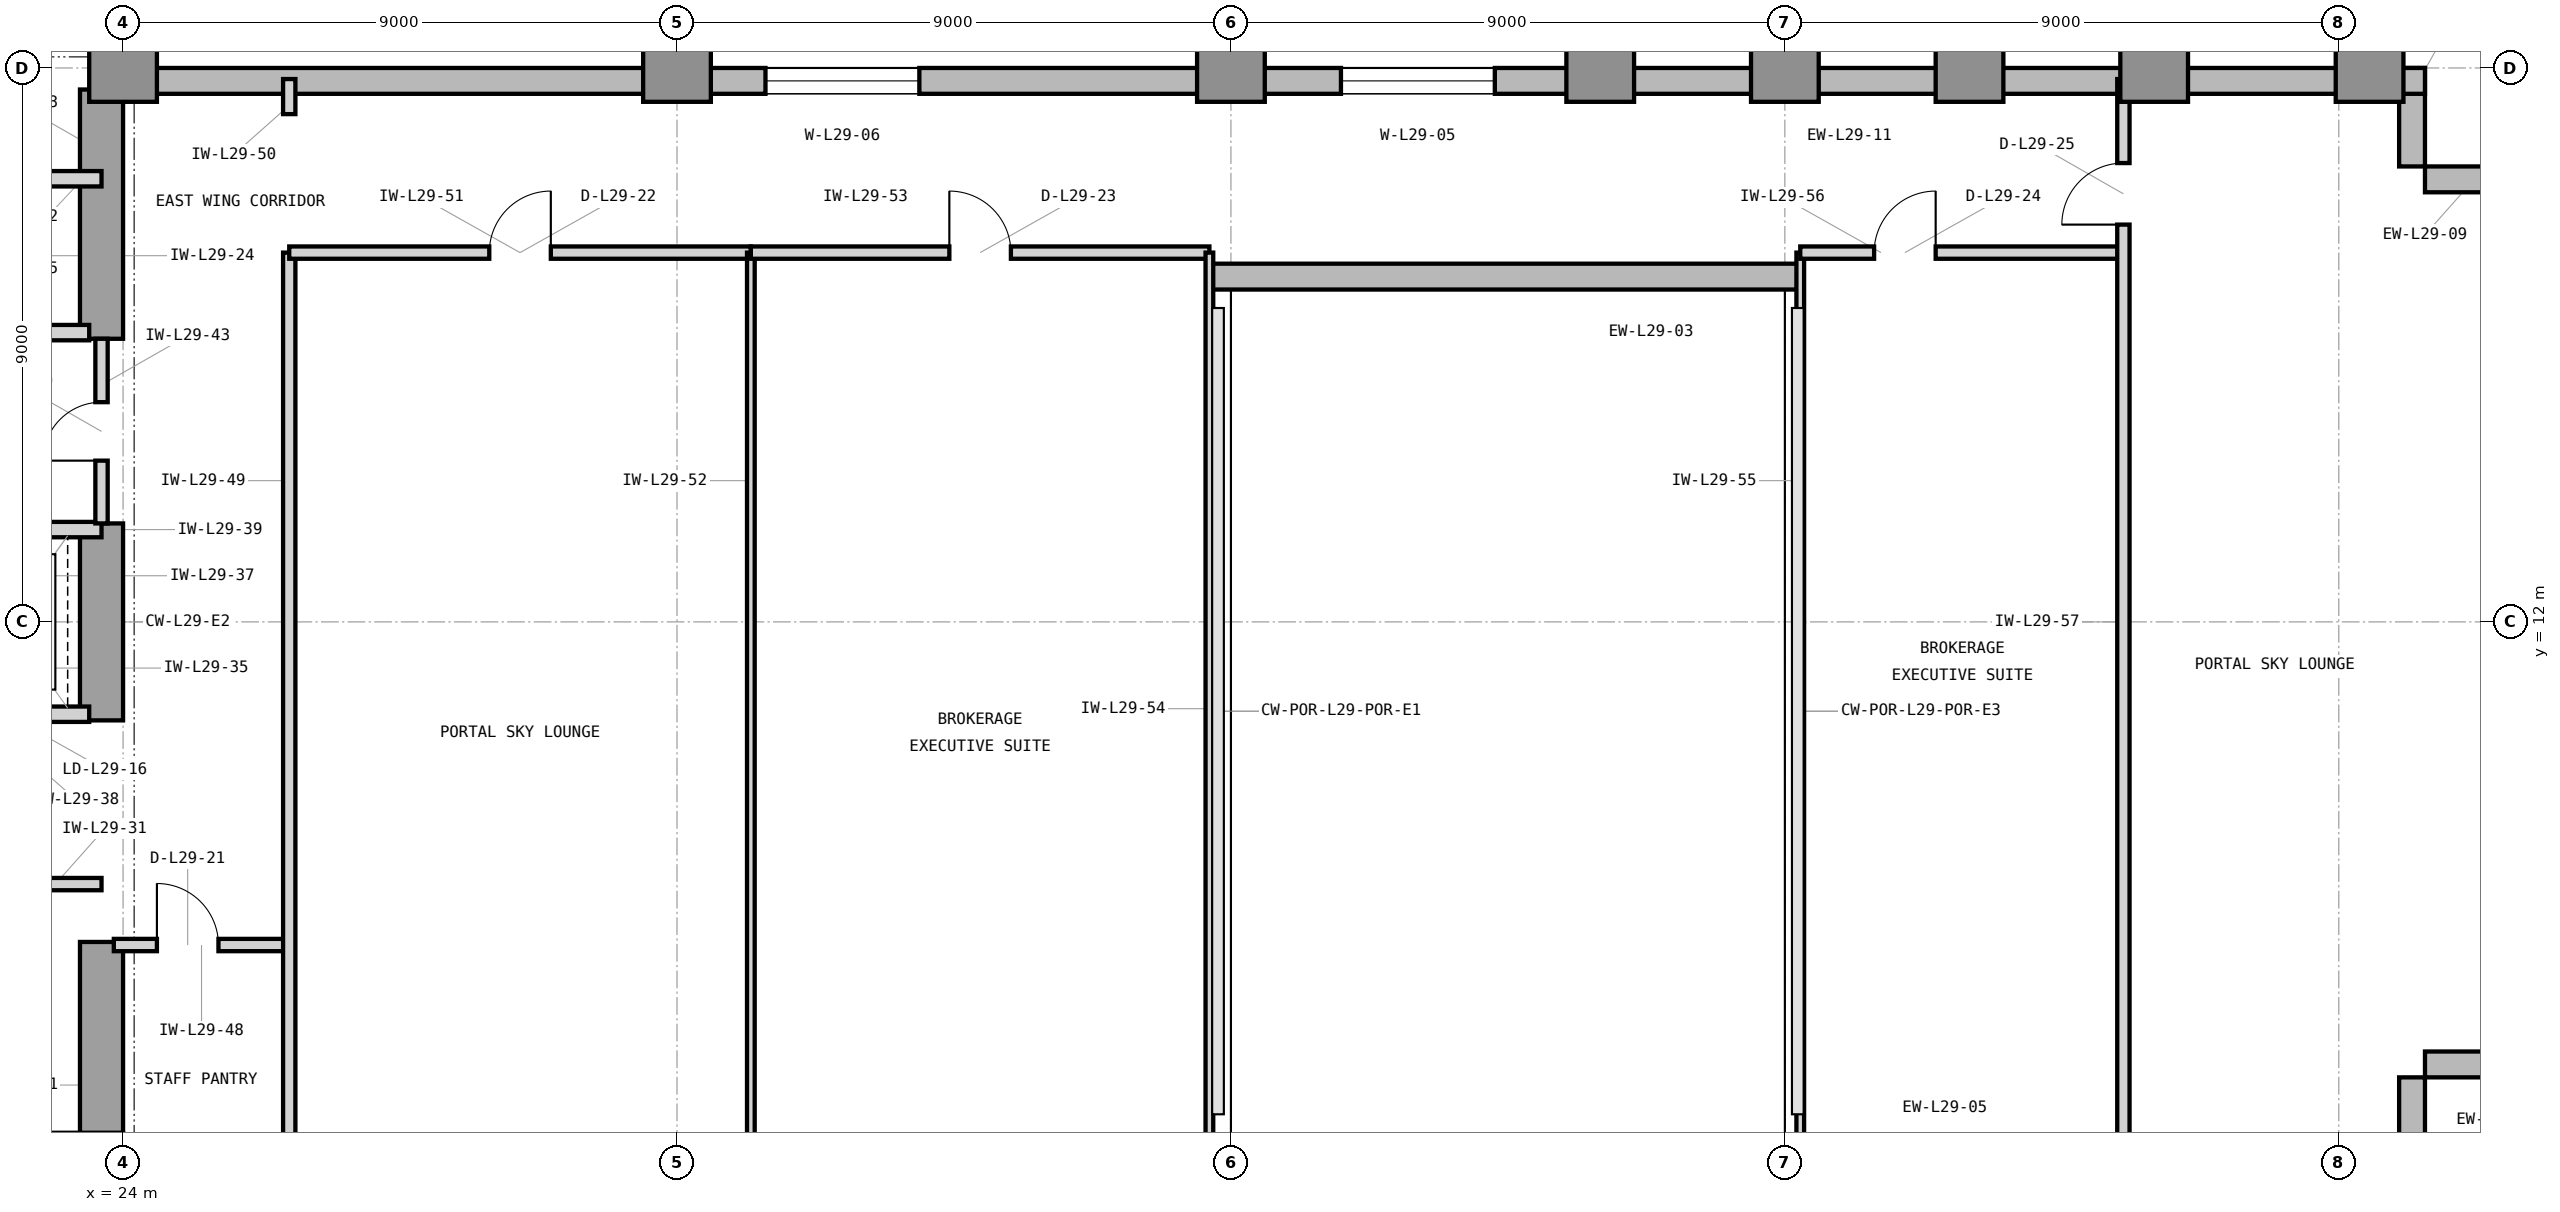
"""IFC4 building model, lengths in metres.
Left out: names, types, materials, properties, quantities, classifications, styles, units other than length and angle.
Written with IfcOpenShell. Run it as: python <this file> out.ifc"""

import sys

from ifc_helpers import new_model, si_unit, direction, frame, frame_2d, origin, origin_2d, place, context, subcontext, project, spatial, rectangle, extrude, element, fill, save


model = new_model("IFC4")
c1 = context("Model", 3, precision=1e-05, world=origin(), true_north=direction((0.0, 1.0)))
c2 = subcontext(c1, "Body", "Model", "MODEL_VIEW")
j1 = project(units=[si_unit("LENGTHUNIT", "METRE"), si_unit("PLANEANGLEUNIT", "RADIAN")], contexts=[c1])
p1 = place(None, origin())
s1 = spatial("IfcSite", under=j1, at=p1, CompositionType="ELEMENT")
p2 = place(p1, origin())
s2 = spatial("IfcBuilding", under=s1, at=p2, CompositionType="ELEMENT")
p3 = place(p2, frame((0.0, 0.0, 124.5)))
s3 = spatial("IfcBuildingStorey", under=s2, at=p3, CompositionType="ELEMENT", Elevation=124.5)
p4 = place(p3, frame((7.475, 3.35, 0.0), z_axis=(0.0, 0.0, 1.0), x_axis=(1.0, 0.0, 0.0)))
e1 = element("IfcWall", 1, at=p4, inside=s3, PredefinedType="SHEAR", context=c2, shape_type="SweptSolid", body=[
    extrude(rectangle(XDim=16.525, YDim=0.7, at=frame_2d((8.262, 0.0))), origin(), (0.0, 0.0, 1.0), 3.9),
])
p5 = place(p3, frame((23.65, 3.7, 0.0), z_axis=(0.0, 0.0, 1.0), x_axis=(0.0, 1.0, 0.0)))
e2 = element("IfcWall", 2, at=p5, inside=s3, PredefinedType="SHEAR", context=c2, shape_type="SweptSolid", body=[
    extrude(rectangle(XDim=3.1, YDim=0.7, at=frame_2d((1.55, 0.0))), origin(), (0.0, 0.0, 1.0), 3.9),
])
p6 = place(p3, frame((23.65, 10.4, 0.0), z_axis=(0.0, 0.0, 1.0), x_axis=(0.0, 1.0, 0.0)))
e3 = element("IfcWall", 3, at=p6, inside=s3, PredefinedType="SHEAR", context=c2, shape_type="SweptSolid", body=[
    extrude(rectangle(XDim=3.2, YDim=0.7, at=frame_2d((1.6, 0.0))), origin(), (0.0, 0.0, 1.0), 3.9),
])
p7 = place(p3, frame((23.65, 16.6, 0.0), z_axis=(0.0, 0.0, 1.0), x_axis=(0.0, 1.0, 0.0)))
e4 = element("IfcWall", 4, at=p7, inside=s3, PredefinedType="SHEAR", context=c2, shape_type="SweptSolid", body=[
    extrude(rectangle(XDim=4.05, YDim=0.7, at=frame_2d((2.025, 0.0))), origin(), (0.0, 0.0, 1.0), 3.9),
])
for number, where, z_axis, x_axis in (
    (5, (24.0, 21.0, 0.0), (0.0, 0.0, 1.0), (1.0, 0.0, 0.0)),
    (6, (33.0, 21.0, 0.0), (0.0, 0.0, 1.0), (1.0, 0.0, 0.0)),
    (7, (42.0, 21.0, 0.0), (0.0, 0.0, 1.0), (1.0, 0.0, 0.0)),
    (8, (48.0, 21.0, 0.0), (0.0, 0.0, 1.0), (1.0, 0.0, 0.0)),
    (9, (51.0, 21.0, 0.0), (0.0, 0.0, 1.0), (1.0, 0.0, 0.0)),
    (10, (54.0, 21.0, 0.0), (0.0, 0.0, 1.0), (1.0, 0.0, 0.0)),
    (11, (57.0, 21.0, 0.0), (0.0, 0.0, 1.0), (1.0, 0.0, 0.0)),
):
    element("IfcColumn", number, at=place(p3, frame(where, z_axis=z_axis, x_axis=x_axis)), inside=s3, PredefinedType="COLUMN", context=c2, shape_type="SweptSolid", body=[
        extrude(rectangle(XDim=1.1, YDim=1.1, at=origin_2d()), origin(), (0.0, 0.0, 1.0), 3.9),
    ])
p8 = place(p3, frame((60.5, 21.0, 0.0), z_axis=(0.0, 0.0, 1.0), x_axis=(1.0, 0.0, 0.0)))
e12 = element("IfcColumn", 12, at=p8, inside=s3, PredefinedType="COLUMN", context=c2, shape_type="SweptSolid", body=[
    extrude(rectangle(XDim=1.1, YDim=1.1, at=origin_2d()), origin(), (0.0, 0.0, 1.0), 3.689),
])
p9 = place(p3, frame((41.7, 17.61, 0.0), z_axis=(0.0, 0.0, 1.0), x_axis=(1.0, 0.0, 0.0)))
e13 = element("IfcWall", 13, at=p9, inside=s3, PredefinedType="STANDARD", context=c2, shape_type="SweptSolid", body=[
    extrude(rectangle(XDim=9.5, YDim=0.42, at=frame_2d((4.75, 0.0))), origin(), (0.0, 0.0, 1.0), 3.7),
])
for number, where, z_axis, x_axis in (
    (14, (61.19, 3.0, 0.0), (0.0, 0.0, 1.0), (0.0, 1.0, 0.0)),
    (15, (61.4, 4.81, 0.0), (0.0, 0.0, 1.0), (1.0, 0.0, 0.0)),
    (16, (63.0, 19.19, 0.0), (0.0, 0.0, 1.0), (-1.0, 0.0, 0.0)),
    (17, (61.19, 19.4, 0.0), (0.0, 0.0, 1.0), (0.0, 1.0, 0.0)),
):
    element("IfcWall", number, at=place(p3, frame(where, z_axis=z_axis, x_axis=x_axis)), inside=s3, PredefinedType="STANDARD", context=c2, shape_type="SweptSolid", body=[
        extrude(rectangle(XDim=1.6, YDim=0.42, at=frame_2d((0.8, 0.0))), origin(), (0.0, 0.0, 1.0), 3.7),
    ])
p10 = place(p3, frame((61.4, 20.79, 0.0), z_axis=(0.0, 0.0, 1.0), x_axis=(-1.0, 0.0, 0.0)))
e18 = element("IfcWall", 18, at=p10, inside=s3, PredefinedType="STANDARD", context=c2, shape_type="SweptSolid", body=[
    extrude(rectangle(XDim=37.4, YDim=0.42, at=frame_2d((18.7, 0.0))), origin(), (0.0, 0.0, 1.0), 3.7),
])
p11 = place(p10, frame((15.113, 0.0, 0.85)))
e19 = element("IfcOpeningElement", 19, at=p11, cuts=e18, PredefinedType="OPENING", context=c2, shape_type="SweptSolid", body=[
    extrude(rectangle(XDim=2.5, YDim=2.25, at=frame_2d((1.25, 1.125))), frame((0.0, 0.22, 0.0), z_axis=(0.0, -1.0, 0.0), x_axis=(1.0, 0.0, 0.0)), (0.0, 0.0, 1.0), 0.44),
])
p12 = place(p10, frame((24.462, 0.0, 0.85)))
e20 = element("IfcOpeningElement", 20, at=p12, cuts=e18, PredefinedType="OPENING", context=c2, shape_type="SweptSolid", body=[
    extrude(rectangle(XDim=2.5, YDim=2.25, at=frame_2d((1.25, 1.125))), frame((0.0, 0.22, 0.0), z_axis=(0.0, -1.0, 0.0), x_axis=(1.0, 0.0, 0.0)), (0.0, 0.0, 1.0), 0.44),
])
p13 = place(p3, frame((23.79, 21.0, 0.0), z_axis=(0.0, 0.0, 1.0), x_axis=(0.0, 1.0, 0.0)))
e21 = element("IfcWall", 21, at=p13, inside=s3, PredefinedType="STANDARD", context=c2, shape_type="SweptSolid", body=[
    extrude(rectangle(XDim=25.4, YDim=0.42, at=frame_2d((12.7, 0.0))), origin(), (0.0, 0.0, 1.0), 3.7),
])
p14 = place(p13, frame((11.45, 0.0, 0.85)))
e22 = element("IfcOpeningElement", 22, at=p14, cuts=e21, PredefinedType="OPENING", context=c2, shape_type="SweptSolid", body=[
    extrude(rectangle(XDim=2.5, YDim=2.25, at=frame_2d((1.25, 1.125))), frame((0.0, 0.22, 0.0), z_axis=(0.0, -1.0, 0.0), x_axis=(1.0, 0.0, 0.0)), (0.0, 0.0, 1.0), 0.44),
])
p15 = place(p3, frame((21.05, 16.7, 0.0), z_axis=(0.0, 0.0, 1.0), x_axis=(1.0, 0.0, 0.0)))
e23 = element("IfcWall", 23, at=p15, inside=s3, PredefinedType="PARTITIONING", context=c2, shape_type="SweptSolid", body=[
    extrude(rectangle(XDim=2.4, YDim=0.25, at=frame_2d((1.2, 0.0))), origin(), (0.0, 0.0, 1.0), 3.233),
])
p16 = place(p3, frame((16.45, 19.2, 0.0), z_axis=(0.0, 0.0, 1.0), x_axis=(1.0, 0.0, 0.0)))
e24 = element("IfcWall", 24, at=p16, inside=s3, PredefinedType="PARTITIONING", context=c2, shape_type="SweptSolid", body=[
    extrude(rectangle(XDim=7.2, YDim=0.25, at=frame_2d((3.6, 0.0))), origin(), (0.0, 0.0, 1.0), 3.69),
])
p17 = place(p3, frame((20.65, 7.74, 0.0), z_axis=(0.0, 0.0, 1.0), x_axis=(1.0, 0.0, 0.0)))
e25 = element("IfcWall", 25, at=p17, inside=s3, PredefinedType="PARTITIONING", context=c2, shape_type="SweptSolid", body=[
    extrude(rectangle(XDim=3.0, YDim=0.2, at=frame_2d((1.5, 0.0))), origin(), (0.0, 0.0, 1.0), 3.69),
])
p18 = place(p17, frame((1.025, 0.0, 0.0)))
e26 = element("IfcOpeningElement", 26, at=p18, cuts=e25, PredefinedType="OPENING", context=c2, shape_type="SweptSolid", body=[
    extrude(rectangle(XDim=0.95, YDim=2.1, at=frame_2d((0.475, 1.05))), frame((0.0, 0.11, 0.0), z_axis=(0.0, -1.0, 0.0), x_axis=(1.0, 0.0, 0.0)), (0.0, 0.0, 1.0), 0.22),
])
p19 = place(p3, frame((21.05, 10.5, 0.0), z_axis=(0.0, 0.0, 1.0), x_axis=(1.0, 0.0, 0.0)))
e27 = element("IfcWall", 27, at=p19, inside=s3, PredefinedType="PARTITIONING", context=c2, shape_type="SweptSolid", body=[
    extrude(rectangle(XDim=2.4, YDim=0.25, at=frame_2d((1.2, 0.0))), origin(), (0.0, 0.0, 1.0), 3.233),
])
p20 = place(p19, frame((0.48, 0.0, 0.0)))
e28 = element("IfcOpeningElement", 28, at=p20, cuts=e27, PredefinedType="OPENING", context=c2, shape_type="SweptSolid", body=[
    extrude(rectangle(XDim=1.15, YDim=2.25, at=frame_2d((0.575, 1.125))), frame((0.0, 0.135, 0.0), z_axis=(0.0, -1.0, 0.0), x_axis=(1.0, 0.0, 0.0)), (0.0, 0.0, 1.0), 0.27),
])
p21 = place(p3, frame((14.7, 13.5, 0.0), z_axis=(0.0, 0.0, 1.0), x_axis=(1.0, 0.0, 0.0)))
e29 = element("IfcWall", 29, at=p21, inside=s3, PredefinedType="PARTITIONING", context=c2, shape_type="SweptSolid", body=[
    extrude(rectangle(XDim=8.95, YDim=0.25, at=frame_2d((4.475, 0.0))), origin(), (0.0, 0.0, 1.0), 3.233),
])
p22 = place(p3, frame((23.65, 13.6, 0.0), z_axis=(0.0, 0.0, 1.0), x_axis=(0.0, 1.0, 0.0)))
e30 = element("IfcWall", 30, at=p22, inside=s3, PredefinedType="PARTITIONING", context=c2, shape_type="SweptSolid", body=[
    extrude(rectangle(XDim=3.0, YDim=0.2, at=frame_2d((1.5, 0.0))), origin(), (0.0, 0.0, 1.0), 3.69),
])
p23 = place(p22, frame((1.02, 0.0, 0.0)))
e31 = element("IfcOpeningElement", 31, at=p23, cuts=e30, PredefinedType="OPENING", context=c2, shape_type="SweptSolid", body=[
    extrude(rectangle(XDim=0.95, YDim=2.1, at=frame_2d((0.475, 1.05))), frame((0.0, 0.11, 0.0), z_axis=(0.0, -1.0, 0.0), x_axis=(1.0, 0.0, 0.0)), (0.0, 0.0, 1.0), 0.22),
])
p24 = place(p3, frame((23.85, 6.75, 0.0), z_axis=(0.0, 0.0, 1.0), x_axis=(1.0, 0.0, 0.0)))
e32 = element("IfcWall", 32, at=p24, inside=s3, PredefinedType="PARTITIONING", context=c2, shape_type="SweptSolid", body=[
    extrude(rectangle(XDim=2.85, YDim=0.2, at=frame_2d((1.425, 0.0))), origin(), (0.0, 0.0, 1.0), 3.69),
])
p25 = place(p24, frame((0.7, 0.0, 0.0)))
e33 = element("IfcOpeningElement", 33, at=p25, cuts=e32, PredefinedType="OPENING", context=c2, shape_type="SweptSolid", body=[
    extrude(rectangle(XDim=1.0, YDim=2.15, at=frame_2d((0.5, 1.075))), frame((0.0, 0.11, 0.0), z_axis=(0.0, -1.0, 0.0), x_axis=(1.0, 0.0, 0.0)), (0.0, 0.0, 1.0), 0.22),
])
p26 = place(p3, frame((26.7, 3.18, 0.0), z_axis=(0.0, 0.0, 1.0), x_axis=(0.0, 1.0, 0.0)))
e34 = element("IfcWall", 34, at=p26, inside=s3, PredefinedType="PARTITIONING", context=c2, shape_type="SweptSolid", body=[
    extrude(rectangle(XDim=14.82, YDim=0.2, at=frame_2d((7.41, 0.0))), origin(), (0.0, 0.0, 1.0), 3.69),
])
p27 = place(p3, frame((26.7, 20.25, 0.0), z_axis=(0.0, 0.0, 1.0), x_axis=(0.0, 1.0, 0.0)))
e35 = element("IfcWall", 35, at=p27, inside=s3, PredefinedType="PARTITIONING", context=c2, shape_type="SweptSolid", body=[
    extrude(rectangle(XDim=0.57, YDim=0.2, at=frame_2d((0.285, 0.0))), origin(), (0.0, 0.0, 1.0), 3.69),
])
p28 = place(p3, frame((26.7, 18.0, 0.0), z_axis=(0.0, 0.0, 1.0), x_axis=(1.0, 0.0, 0.0)))
e36 = element("IfcWall", 36, at=p28, inside=s3, PredefinedType="PARTITIONING", context=c2, shape_type="SweptSolid", body=[
    extrude(rectangle(XDim=7.5, YDim=0.2, at=frame_2d((3.75, 0.0))), origin(), (0.0, 0.0, 1.0), 3.233),
])
p29 = place(p28, frame((3.25, 0.0, 0.0)))
e37 = element("IfcOpeningElement", 37, at=p29, cuts=e36, PredefinedType="OPENING", context=c2, shape_type="SweptSolid", body=[
    extrude(rectangle(XDim=1.0, YDim=2.15, at=frame_2d((0.5, 1.075))), frame((0.0, 0.11, 0.0), z_axis=(0.0, -1.0, 0.0), x_axis=(1.0, 0.0, 0.0)), (0.0, 0.0, 1.0), 0.22),
])
p30 = place(p3, frame((34.2, 3.18, 0.0), z_axis=(0.0, 0.0, 1.0), x_axis=(0.0, 1.0, 0.0)))
e38 = element("IfcWall", 38, at=p30, inside=s3, PredefinedType="PARTITIONING", context=c2, shape_type="SweptSolid", body=[
    extrude(rectangle(XDim=14.82, YDim=0.125, at=frame_2d((7.41, 0.0))), origin(), (0.0, 0.0, 1.0), 3.69),
])
p31 = place(p3, frame((34.2, 18.0, 0.0), z_axis=(0.0, 0.0, 1.0), x_axis=(1.0, 0.0, 0.0)))
e39 = element("IfcWall", 39, at=p31, inside=s3, PredefinedType="PARTITIONING", context=c2, shape_type="SweptSolid", body=[
    extrude(rectangle(XDim=7.45, YDim=0.2, at=frame_2d((3.725, 0.0))), origin(), (0.0, 0.0, 1.0), 3.233),
])
p32 = place(p31, frame((3.225, 0.0, 0.0)))
e40 = element("IfcOpeningElement", 40, at=p32, cuts=e39, PredefinedType="OPENING", context=c2, shape_type="SweptSolid", body=[
    extrude(rectangle(XDim=1.0, YDim=2.15, at=frame_2d((0.5, 1.075))), frame((0.0, 0.11, 0.0), z_axis=(0.0, -1.0, 0.0), x_axis=(1.0, 0.0, 0.0)), (0.0, 0.0, 1.0), 0.22),
])
for number, where, z_axis, x_axis in (
    (41, (41.65, 3.18, 0.0), (0.0, 0.0, 1.0), (0.0, 1.0, 0.0)),
    (42, (51.25, 3.18, 0.0), (0.0, 0.0, 1.0), (0.0, 1.0, 0.0)),
):
    element("IfcWall", number, at=place(p3, frame(where, z_axis=z_axis, x_axis=x_axis)), inside=s3, PredefinedType="PARTITIONING", context=c2, shape_type="SweptSolid", body=[
        extrude(rectangle(XDim=14.82, YDim=0.125, at=frame_2d((7.41, 0.0))), origin(), (0.0, 0.0, 1.0), 3.69),
    ])
p33 = place(p3, frame((51.25, 18.0, 0.0), z_axis=(0.0, 0.0, 1.0), x_axis=(1.0, 0.0, 0.0)))
e43 = element("IfcWall", 43, at=p33, inside=s3, PredefinedType="PARTITIONING", context=c2, shape_type="SweptSolid", body=[
    extrude(rectangle(XDim=5.25, YDim=0.2, at=frame_2d((2.625, 0.0))), origin(), (0.0, 0.0, 1.0), 3.233),
])
p34 = place(p33, frame((1.2, 0.0, 0.0)))
e44 = element("IfcOpeningElement", 44, at=p34, cuts=e43, PredefinedType="OPENING", context=c2, shape_type="SweptSolid", body=[
    extrude(rectangle(XDim=1.0, YDim=2.15, at=frame_2d((0.5, 1.075))), frame((0.0, 0.11, 0.0), z_axis=(0.0, -1.0, 0.0), x_axis=(1.0, 0.0, 0.0)), (0.0, 0.0, 1.0), 0.22),
])
p35 = place(p3, frame((56.5, 3.18, 0.0), z_axis=(0.0, 0.0, 1.0), x_axis=(0.0, 1.0, 0.0)))
e45 = element("IfcWall", 45, at=p35, inside=s3, PredefinedType="PARTITIONING", context=c2, shape_type="SweptSolid", body=[
    extrude(rectangle(XDim=17.64, YDim=0.2, at=frame_2d((8.82, 0.0))), origin(), (0.0, 0.0, 1.0), 3.69),
])
p36 = place(p35, frame((15.275, 0.0, 0.0)))
e46 = element("IfcOpeningElement", 46, at=p36, cuts=e45, PredefinedType="OPENING", context=c2, shape_type="SweptSolid", body=[
    extrude(rectangle(XDim=1.0, YDim=2.15, at=frame_2d((0.5, 1.075))), frame((0.0, 0.11, 0.0), z_axis=(0.0, -1.0, 0.0), x_axis=(1.0, 0.0, 0.0)), (0.0, 0.0, 1.0), 0.22),
])
p37 = place(p11, origin())
e47 = element("IfcWindow", 47, at=p37, inside=s3, PartitioningType="SINGLE_PANEL", PredefinedType="WINDOW", context=c2, shape_type="SweptSolid", body=[
    extrude(rectangle(XDim=2.5, YDim=2.25, at=frame_2d((1.25, 1.125))), frame((0.0, 0.11, 0.0), z_axis=(0.0, -1.0, 0.0), x_axis=(1.0, 0.0, 0.0)), (0.0, 0.0, 1.0), 0.06),
])
fill(e19, e47)
p38 = place(p12, origin())
e48 = element("IfcWindow", 48, at=p38, inside=s3, PartitioningType="SINGLE_PANEL", PredefinedType="WINDOW", context=c2, shape_type="SweptSolid", body=[
    extrude(rectangle(XDim=2.5, YDim=2.25, at=frame_2d((1.25, 1.125))), frame((0.0, 0.11, 0.0), z_axis=(0.0, -1.0, 0.0), x_axis=(1.0, 0.0, 0.0)), (0.0, 0.0, 1.0), 0.06),
])
fill(e20, e48)
p39 = place(p23, origin())
e49 = element("IfcDoor", 49, at=p39, inside=s3, OperationType="SINGLE_SWING_LEFT", PredefinedType="DOOR", context=c2, shape_type="SweptSolid", body=[
    extrude(rectangle(XDim=0.95, YDim=2.1, at=frame_2d((0.475, 1.05))), frame((0.0, 0.025, 0.0), z_axis=(0.0, -1.0, 0.0), x_axis=(1.0, 0.0, 0.0)), (0.0, 0.0, 1.0), 0.05),
])
fill(e31, e49)
p40 = place(p25, origin())
e50 = element("IfcDoor", 50, at=p40, inside=s3, OperationType="SINGLE_SWING_LEFT", PredefinedType="DOOR", context=c2, shape_type="SweptSolid", body=[
    extrude(rectangle(XDim=1.0, YDim=2.15, at=frame_2d((0.5, 1.075))), frame((0.0, 0.025, 0.0), z_axis=(0.0, -1.0, 0.0), x_axis=(1.0, 0.0, 0.0)), (0.0, 0.0, 1.0), 0.05),
])
fill(e33, e50)
p41 = place(p29, origin())
e51 = element("IfcDoor", 51, at=p41, inside=s3, OperationType="SINGLE_SWING_RIGHT", PredefinedType="DOOR", context=c2, shape_type="SweptSolid", body=[
    extrude(rectangle(XDim=1.0, YDim=2.15, at=frame_2d((0.5, 1.075))), frame((0.0, 0.025, 0.0), z_axis=(0.0, -1.0, 0.0), x_axis=(1.0, 0.0, 0.0)), (0.0, 0.0, 1.0), 0.05),
])
fill(e37, e51)
p42 = place(p32, origin())
e52 = element("IfcDoor", 52, at=p42, inside=s3, OperationType="SINGLE_SWING_LEFT", PredefinedType="DOOR", context=c2, shape_type="SweptSolid", body=[
    extrude(rectangle(XDim=1.0, YDim=2.15, at=frame_2d((0.5, 1.075))), frame((0.0, 0.025, 0.0), z_axis=(0.0, -1.0, 0.0), x_axis=(1.0, 0.0, 0.0)), (0.0, 0.0, 1.0), 0.05),
])
fill(e40, e52)
p43 = place(p34, origin())
e53 = element("IfcDoor", 53, at=p43, inside=s3, OperationType="SINGLE_SWING_RIGHT", PredefinedType="DOOR", context=c2, shape_type="SweptSolid", body=[
    extrude(rectangle(XDim=1.0, YDim=2.15, at=frame_2d((0.5, 1.075))), frame((0.0, 0.025, 0.0), z_axis=(0.0, -1.0, 0.0), x_axis=(1.0, 0.0, 0.0)), (0.0, 0.0, 1.0), 0.05),
])
fill(e44, e53)
p44 = place(p36, origin())
e54 = element("IfcDoor", 54, at=p44, inside=s3, OperationType="SINGLE_SWING_LEFT", PredefinedType="DOOR", context=c2, shape_type="SweptSolid", body=[
    extrude(rectangle(XDim=1.0, YDim=2.15, at=frame_2d((0.5, 1.075))), frame((0.0, 0.025, 0.0), z_axis=(0.0, -1.0, 0.0), x_axis=(1.0, 0.0, 0.0)), (0.0, 0.0, 1.0), 0.05),
])
fill(e46, e54)
save(model, sys.argv[1])
